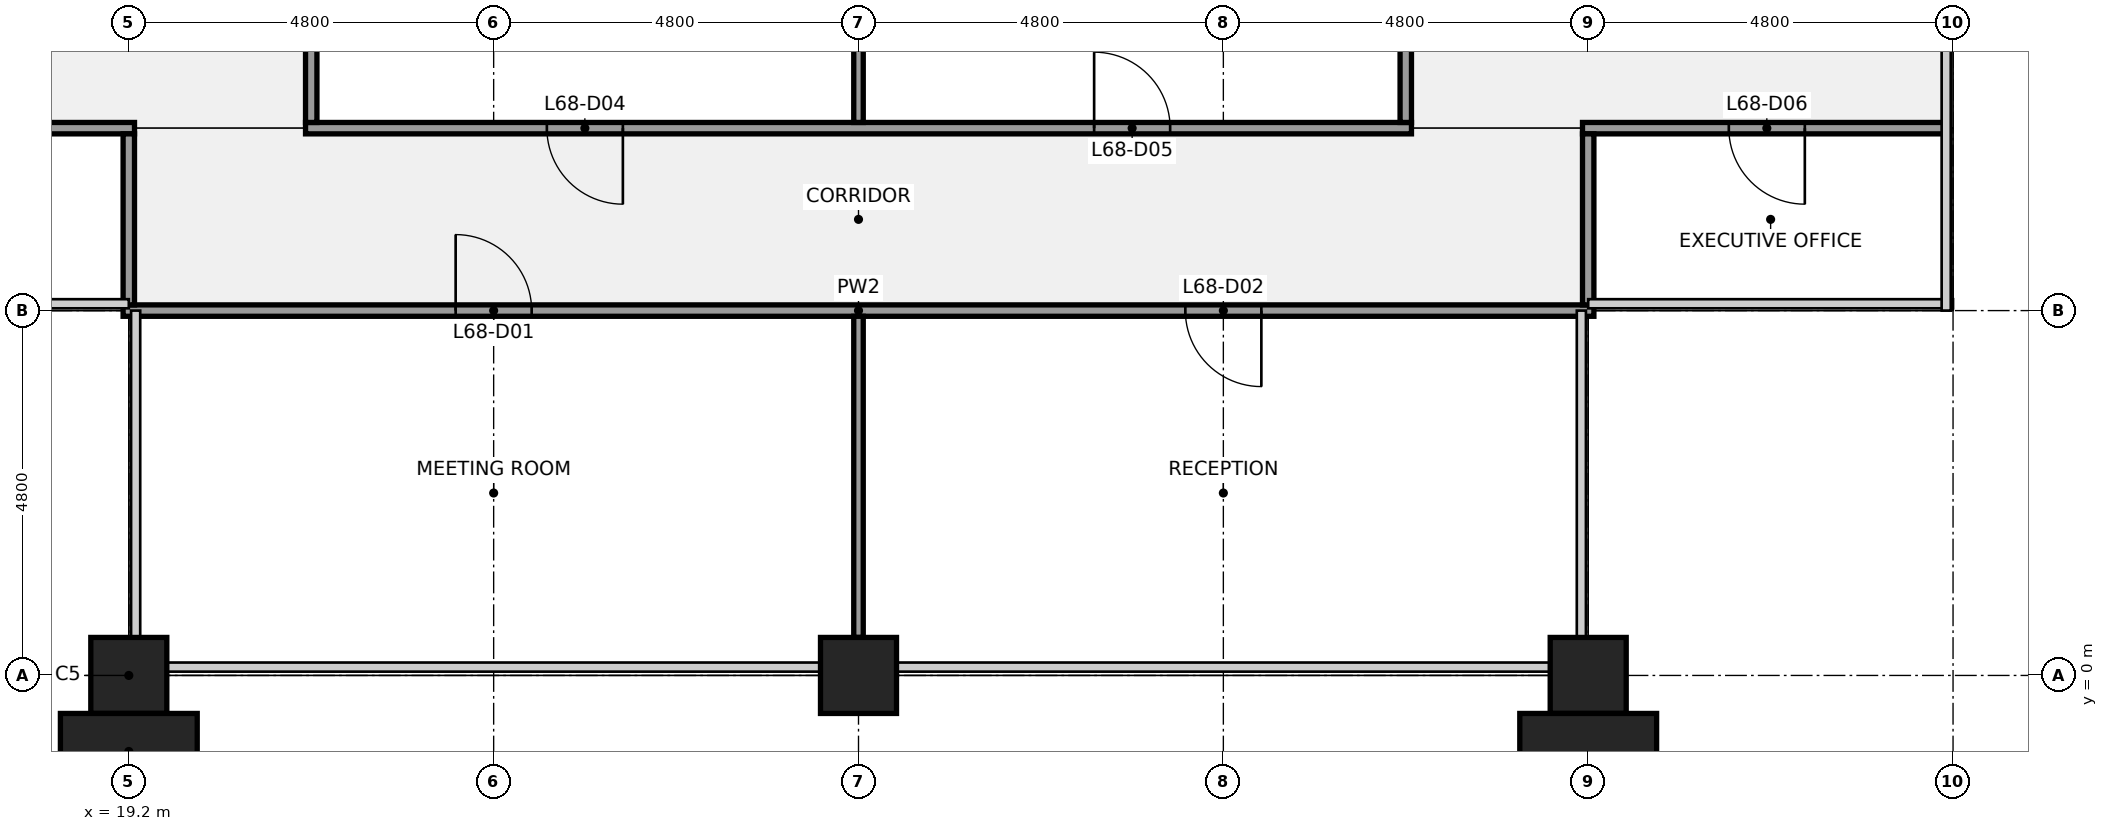
"""IFC4 building model, lengths in metres.
Left out: names, types, materials, properties, quantities, classifications, styles, units other than length and angle.
Written with IfcOpenShell. Run it as: python <this file> out.ifc"""

import sys

from ifc_helpers import new_model, si_unit, direction, frame, frame_2d, origin, origin_2d, place, context, subcontext, project, spatial, rectangle, extrude, element, fill, save


model = new_model("IFC4")
c1 = context("Model", 3, precision=1e-05, world=origin(), true_north=direction((0.0, 1.0)))
c2 = subcontext(c1, "Body", "Model", "MODEL_VIEW")
j1 = project(units=[si_unit("LENGTHUNIT", "METRE"), si_unit("PLANEANGLEUNIT", "RADIAN")], contexts=[c1])
p1 = place(None, origin())
s1 = spatial("IfcSite", under=j1, at=p1, CompositionType="ELEMENT")
p2 = place(p1, origin())
s2 = spatial("IfcBuilding", under=s1, at=p2, CompositionType="ELEMENT")
p3 = place(p2, frame((0.0, 0.0, 310.3)))
s3 = spatial("IfcBuildingStorey", under=s2, at=p3, CompositionType="ELEMENT", Elevation=310.3)
for number, where, z_axis, x_axis in (
    (1, (19.2, 0.0, 0.0), (0.0, 0.0, 1.0), (1.0, 0.0, 0.0)),
    (2, (28.8, 0.0, 0.0), (0.0, 0.0, 1.0), (1.0, 0.0, 0.0)),
    (3, (38.4, 0.0, 0.0), (0.0, 0.0, 1.0), (1.0, 0.0, 0.0)),
):
    element("IfcColumn", number, at=place(p3, frame(where, z_axis=z_axis, x_axis=x_axis)), inside=s3, PredefinedType="COLUMN", context=c2, shape_type="SweptSolid", body=[
        extrude(rectangle(XDim=1.0, YDim=1.0, at=origin_2d()), origin(), (0.0, 0.0, 1.0), 4.0),
    ])
p4 = place(p3, frame((19.125, 4.8, 0.0), z_axis=(0.0, 0.0, 1.0), x_axis=(1.0, 0.0, 0.0)))
e4 = element("IfcWall", 4, at=p4, inside=s3, PredefinedType="PARTITIONING", context=c2, shape_type="SweptSolid", body=[
    extrude(rectangle(XDim=19.35, YDim=0.15, at=frame_2d((9.675, 0.0))), origin(), (0.0, 0.0, 1.0), 2.849),
])
p5 = place(p4, frame((4.375, 0.0, 0.0)))
e5 = element("IfcOpeningElement", 5, at=p5, cuts=e4, PredefinedType="OPENING", context=c2, shape_type="SweptSolid", body=[
    extrude(rectangle(XDim=1.0, YDim=2.1, at=frame_2d((0.5, 1.05))), frame((0.0, 0.085, 0.0), z_axis=(0.0, -1.0, 0.0), x_axis=(1.0, 0.0, 0.0)), (0.0, 0.0, 1.0), 0.17),
])
p6 = place(p4, frame((13.975, 0.0, 0.0)))
e6 = element("IfcOpeningElement", 6, at=p6, cuts=e4, PredefinedType="OPENING", context=c2, shape_type="SweptSolid", body=[
    extrude(rectangle(XDim=1.0, YDim=2.1, at=frame_2d((0.5, 1.05))), frame((0.0, 0.085, 0.0), z_axis=(0.0, -1.0, 0.0), x_axis=(1.0, 0.0, 0.0)), (0.0, 0.0, 1.0), 0.17),
])
p7 = place(p3, frame((14.5, 7.2, 0.0), z_axis=(0.0, 0.0, 1.0), x_axis=(1.0, 0.0, 0.0)))
e7 = element("IfcWall", 7, at=p7, inside=s3, PredefinedType="PARTITIONING", context=c2, shape_type="SweptSolid", body=[
    extrude(rectangle(XDim=4.775, YDim=0.15, at=frame_2d((2.387, 0.0))), origin(), (0.0, 0.0, 1.0), 2.849),
])
p8 = place(p7, frame((1.85, 0.0, 0.0)))
e8 = element("IfcOpeningElement", 8, at=p8, cuts=e7, PredefinedType="OPENING", context=c2, shape_type="SweptSolid", body=[
    extrude(rectangle(XDim=1.0, YDim=2.1, at=frame_2d((0.5, 1.05))), frame((0.0, 0.085, 0.0), z_axis=(0.0, -1.0, 0.0), x_axis=(1.0, 0.0, 0.0)), (0.0, 0.0, 1.0), 0.17),
])
p9 = place(p3, frame((21.525, 7.2, 0.0), z_axis=(0.0, 0.0, 1.0), x_axis=(1.0, 0.0, 0.0)))
e9 = element("IfcWall", 9, at=p9, inside=s3, PredefinedType="PARTITIONING", context=c2, shape_type="SweptSolid", body=[
    extrude(rectangle(XDim=14.55, YDim=0.15, at=frame_2d((7.275, 0.0))), origin(), (0.0, 0.0, 1.0), 2.849),
])
p10 = place(p9, frame((3.175, 0.0, 0.0)))
e10 = element("IfcOpeningElement", 10, at=p10, cuts=e9, PredefinedType="OPENING", context=c2, shape_type="SweptSolid", body=[
    extrude(rectangle(XDim=1.0, YDim=2.1, at=frame_2d((0.5, 1.05))), frame((0.0, 0.085, 0.0), z_axis=(0.0, -1.0, 0.0), x_axis=(1.0, 0.0, 0.0)), (0.0, 0.0, 1.0), 0.17),
])
p11 = place(p9, frame((10.375, 0.0, 0.0)))
e11 = element("IfcOpeningElement", 11, at=p11, cuts=e9, PredefinedType="OPENING", context=c2, shape_type="SweptSolid", body=[
    extrude(rectangle(XDim=1.0, YDim=2.1, at=frame_2d((0.5, 1.05))), frame((0.0, 0.085, 0.0), z_axis=(0.0, -1.0, 0.0), x_axis=(1.0, 0.0, 0.0)), (0.0, 0.0, 1.0), 0.17),
])
p12 = place(p3, frame((38.325, 7.2, 0.0), z_axis=(0.0, 0.0, 1.0), x_axis=(1.0, 0.0, 0.0)))
e12 = element("IfcWall", 12, at=p12, inside=s3, PredefinedType="PARTITIONING", context=c2, shape_type="SweptSolid", body=[
    extrude(rectangle(XDim=4.775, YDim=0.15, at=frame_2d((2.388, 0.0))), origin(), (0.0, 0.0, 1.0), 2.849),
])
p13 = place(p12, frame((1.925, 0.0, 0.0)))
e13 = element("IfcOpeningElement", 13, at=p13, cuts=e12, PredefinedType="OPENING", context=c2, shape_type="SweptSolid", body=[
    extrude(rectangle(XDim=1.0, YDim=2.1, at=frame_2d((0.5, 1.05))), frame((0.0, 0.085, 0.0), z_axis=(0.0, -1.0, 0.0), x_axis=(1.0, 0.0, 0.0)), (0.0, 0.0, 1.0), 0.17),
])
p14 = place(p3, frame((19.2, 4.875, 0.0), z_axis=(0.0, 0.0, 1.0), x_axis=(0.0, 1.0, 0.0)))
e14 = element("IfcWall", 14, at=p14, inside=s3, PredefinedType="PARTITIONING", context=c2, shape_type="SweptSolid", body=[
    extrude(rectangle(XDim=2.25, YDim=0.15, at=frame_2d((1.125, 0.0))), origin(), (0.0, 0.0, 1.0), 2.849),
])
p15 = place(p3, frame((21.6, 7.275, 0.0), z_axis=(0.0, 0.0, 1.0), x_axis=(0.0, 1.0, 0.0)))
e15 = element("IfcWall", 15, at=p15, inside=s3, PredefinedType="PARTITIONING", context=c2, shape_type="SweptSolid", body=[
    extrude(rectangle(XDim=3.463, YDim=0.15, at=frame_2d((1.731, 0.0))), origin(), (0.0, 0.0, 1.0), 2.849),
])
p16 = place(p3, frame((28.8, 0.5, 0.0), z_axis=(0.0, 0.0, 1.0), x_axis=(0.0, 1.0, 0.0)))
e16 = element("IfcWall", 16, at=p16, inside=s3, PredefinedType="PARTITIONING", context=c2, shape_type="SweptSolid", body=[
    extrude(rectangle(XDim=4.225, YDim=0.125, at=frame_2d((2.113, 0.0))), origin(), (0.0, 0.0, 1.0), 2.849),
])
p17 = place(p3, frame((28.8, 7.275, 0.0), z_axis=(0.0, 0.0, 1.0), x_axis=(0.0, 1.0, 0.0)))
e17 = element("IfcWall", 17, at=p17, inside=s3, PredefinedType="PARTITIONING", context=c2, shape_type="SweptSolid", body=[
    extrude(rectangle(XDim=3.463, YDim=0.125, at=frame_2d((1.731, 0.0))), origin(), (0.0, 0.0, 1.0), 2.849),
])
p18 = place(p3, frame((36.0, 7.275, 0.0), z_axis=(0.0, 0.0, 1.0), x_axis=(0.0, 1.0, 0.0)))
e18 = element("IfcWall", 18, at=p18, inside=s3, PredefinedType="PARTITIONING", context=c2, shape_type="SweptSolid", body=[
    extrude(rectangle(XDim=3.463, YDim=0.15, at=frame_2d((1.731, 0.0))), origin(), (0.0, 0.0, 1.0), 2.849),
])
p19 = place(p3, frame((38.4, 4.875, 0.0), z_axis=(0.0, 0.0, 1.0), x_axis=(0.0, 1.0, 0.0)))
e19 = element("IfcWall", 19, at=p19, inside=s3, PredefinedType="PARTITIONING", context=c2, shape_type="SweptSolid", body=[
    extrude(rectangle(XDim=2.25, YDim=0.15, at=frame_2d((1.125, 0.0))), origin(), (0.0, 0.0, 1.0), 2.849),
])
for number, where, z_axis, x_axis in (
    (20, (19.2, -1.0, 0.0), (0.0, 0.0, 1.0), (1.0, 0.0, 0.0)),
    (21, (38.4, -1.0, 0.0), (0.0, 0.0, 1.0), (1.0, 0.0, 0.0)),
):
    element("IfcColumn", number, at=place(p3, frame(where, z_axis=z_axis, x_axis=x_axis)), inside=s3, PredefinedType="PILASTER", context=c2, shape_type="SweptSolid", body=[
        extrude(rectangle(XDim=1.8, YDim=1.0, at=origin_2d()), origin(), (0.0, 0.0, 1.0), 4.0),
    ])
p20 = place(p5, origin())
e22 = element("IfcDoor", 22, at=p20, inside=s3, OperationType="SINGLE_SWING_LEFT", PredefinedType="DOOR", context=c2, shape_type="SweptSolid", body=[
    extrude(rectangle(XDim=1.0, YDim=2.1, at=frame_2d((0.5, 1.05))), frame((0.0, 0.025, 0.0), z_axis=(0.0, -1.0, 0.0), x_axis=(1.0, 0.0, 0.0)), (0.0, 0.0, 1.0), 0.05),
])
fill(e5, e22)
p21 = place(p6, origin())
e23 = element("IfcDoor", 23, at=p21, inside=s3, OperationType="SINGLE_SWING_RIGHT", PredefinedType="DOOR", context=c2, shape_type="SweptSolid", body=[
    extrude(rectangle(XDim=1.0, YDim=2.1, at=frame_2d((0.5, 1.05))), frame((0.0, 0.025, 0.0), z_axis=(0.0, -1.0, 0.0), x_axis=(1.0, 0.0, 0.0)), (0.0, 0.0, 1.0), 0.05),
])
fill(e6, e23)
p22 = place(p10, origin())
e24 = element("IfcDoor", 24, at=p22, inside=s3, OperationType="SINGLE_SWING_RIGHT", PredefinedType="DOOR", context=c2, shape_type="SweptSolid", body=[
    extrude(rectangle(XDim=1.0, YDim=2.1, at=frame_2d((0.5, 1.05))), frame((0.0, 0.025, 0.0), z_axis=(0.0, -1.0, 0.0), x_axis=(1.0, 0.0, 0.0)), (0.0, 0.0, 1.0), 0.05),
])
fill(e10, e24)
p23 = place(p11, origin())
e25 = element("IfcDoor", 25, at=p23, inside=s3, OperationType="SINGLE_SWING_LEFT", PredefinedType="DOOR", context=c2, shape_type="SweptSolid", body=[
    extrude(rectangle(XDim=1.0, YDim=2.1, at=frame_2d((0.5, 1.05))), frame((0.0, 0.025, 0.0), z_axis=(0.0, -1.0, 0.0), x_axis=(1.0, 0.0, 0.0)), (0.0, 0.0, 1.0), 0.05),
])
fill(e11, e25)
p24 = place(p13, origin())
e26 = element("IfcDoor", 26, at=p24, inside=s3, OperationType="SINGLE_SWING_RIGHT", PredefinedType="DOOR", context=c2, shape_type="SweptSolid", body=[
    extrude(rectangle(XDim=1.0, YDim=2.1, at=frame_2d((0.5, 1.05))), frame((0.0, 0.025, 0.0), z_axis=(0.0, -1.0, 0.0), x_axis=(1.0, 0.0, 0.0)), (0.0, 0.0, 1.0), 0.05),
])
fill(e13, e26)
save(model, sys.argv[1])
